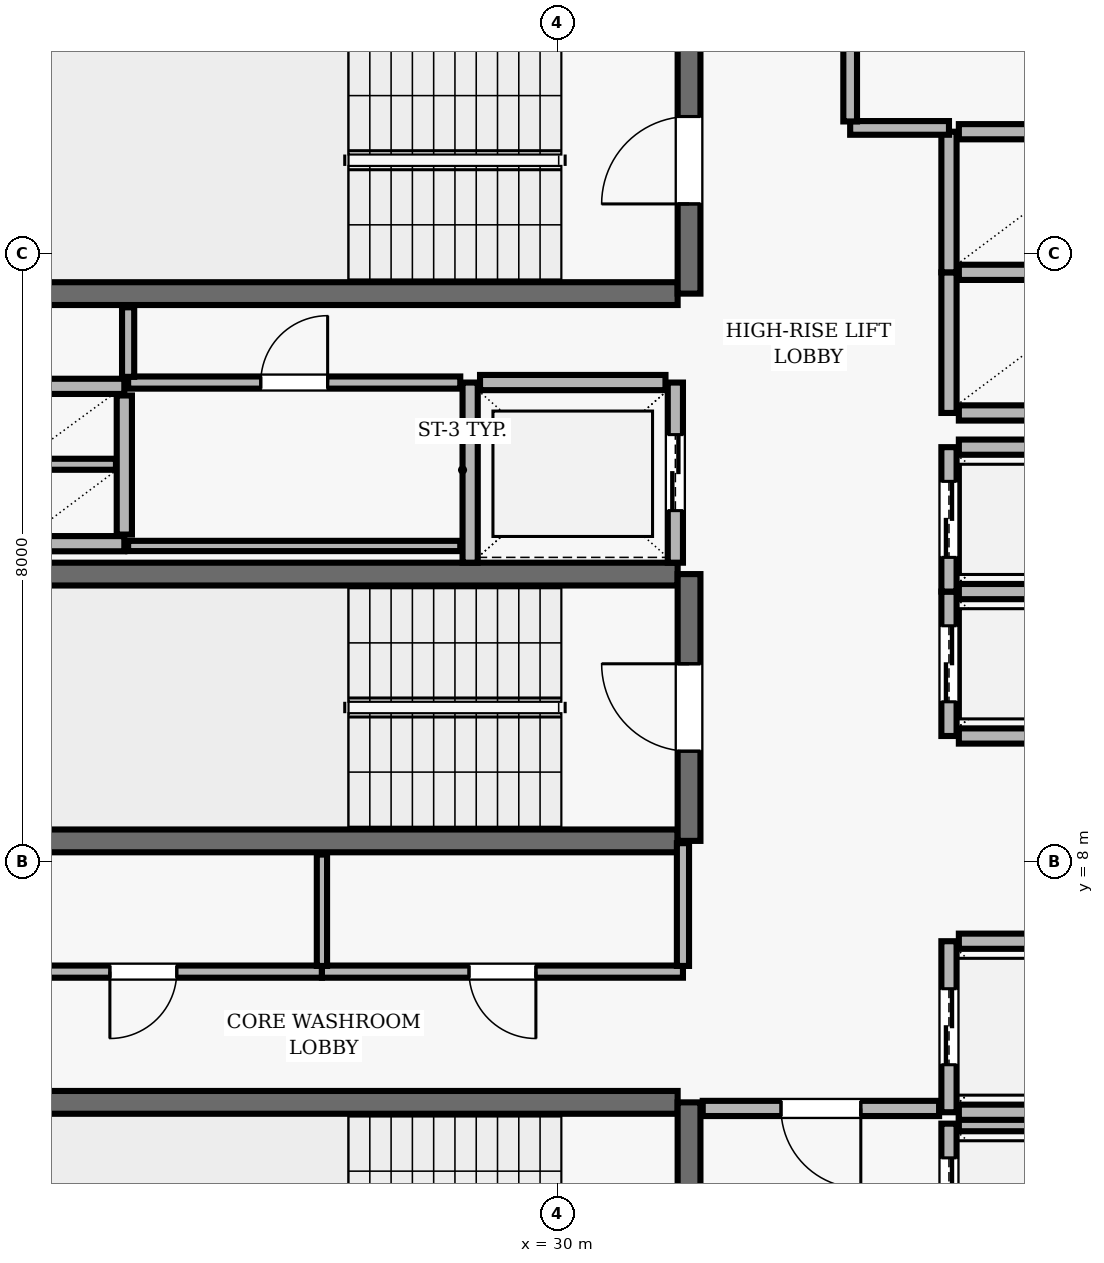
"""IFC4 building model, lengths in metres.
Left out: names, types, materials, properties, quantities, classifications, styles, units other than length and angle.
Written with IfcOpenShell. Run it as: python <this file> out.ifc"""

import sys

from ifc_helpers import new_model, si_unit, direction, frame, frame_2d, origin, place, context, subcontext, project, spatial, rectangle, extrude, element, fill, save


model = new_model("IFC4")
c1 = context("Model", 3, precision=1e-05, world=origin(), true_north=direction((0.0, 1.0)))
c2 = subcontext(c1, "Body", "Model", "MODEL_VIEW")
j1 = project(units=[si_unit("LENGTHUNIT", "METRE"), si_unit("PLANEANGLEUNIT", "RADIAN")], contexts=[c1])
p1 = place(None, origin())
s1 = spatial("IfcSite", under=j1, at=p1, CompositionType="ELEMENT")
p2 = place(p1, origin())
s2 = spatial("IfcBuilding", under=s1, at=p2, CompositionType="ELEMENT")
p3 = place(p2, frame((0.0, 0.0, 226.5)))
s3 = spatial("IfcBuildingStorey", under=s2, at=p3, CompositionType="ELEMENT", Elevation=226.5)
p4 = place(p3, frame((31.58, 4.83, 0.0), z_axis=(0.0, 0.0, 1.0), x_axis=(-1.0, 0.0, 0.0)))
e1 = element("IfcWall", 1, at=p4, inside=s3, PredefinedType="SHEAR", context=c2, shape_type="SweptSolid", body=[
    extrude(rectangle(XDim=8.36, YDim=0.3, at=frame_2d((4.18, 0.0))), origin(), (0.0, 0.0, 1.0), 3.69),
])
p5 = place(p3, frame((31.73, 0.96, 0.0), z_axis=(0.0, 0.0, 1.0), x_axis=(0.0, 1.0, 0.0)))
e2 = element("IfcWall", 2, at=p5, inside=s3, PredefinedType="SHEAR", context=c2, shape_type="SweptSolid", body=[
    extrude(rectangle(XDim=3.87, YDim=0.3, at=frame_2d((1.935, 0.0))), origin(), (0.0, 0.0, 1.0), 3.69),
])
p6 = place(p5, frame((1.54, 0.0, 0.0)))
e3 = element("IfcOpeningElement", 3, at=p6, cuts=e2, PredefinedType="OPENING", context=c2, shape_type="SweptSolid", body=[
    extrude(rectangle(XDim=1.15, YDim=2.15, at=frame_2d((0.575, 1.075))), frame((0.0, 0.16, 0.0), z_axis=(0.0, -1.0, 0.0), x_axis=(1.0, 0.0, 0.0)), (0.0, 0.0, 1.0), 0.32),
])
p7 = place(p3, frame((23.22, 15.47, 0.0), z_axis=(0.0, 0.0, 1.0), x_axis=(1.0, 0.0, 0.0)))
e4 = element("IfcWall", 4, at=p7, inside=s3, PredefinedType="SHEAR", context=c2, shape_type="SweptSolid", body=[
    extrude(rectangle(XDim=8.36, YDim=0.3, at=frame_2d((4.18, 0.0))), origin(), (0.0, 0.0, 1.0), 3.69),
])
p8 = place(p3, frame((31.73, 15.47, 0.0), z_axis=(0.0, 0.0, 1.0), x_axis=(0.0, 1.0, 0.0)))
e5 = element("IfcWall", 5, at=p8, inside=s3, PredefinedType="SHEAR", context=c2, shape_type="SweptSolid", body=[
    extrude(rectangle(XDim=3.51, YDim=0.3, at=frame_2d((1.755, 0.0))), origin(), (0.0, 0.0, 1.0), 3.69),
])
p9 = place(p8, frame((1.18, 0.0, 0.0)))
e6 = element("IfcOpeningElement", 6, at=p9, cuts=e5, PredefinedType="OPENING", context=c2, shape_type="SweptSolid", body=[
    extrude(rectangle(XDim=1.15, YDim=2.15, at=frame_2d((0.575, 1.075))), frame((0.0, 0.16, 0.0), z_axis=(0.0, -1.0, 0.0), x_axis=(1.0, 0.0, 0.0)), (0.0, 0.0, 1.0), 0.32),
])
for number, where, z_axis, x_axis in (
    (7, (31.58, 11.78, 0.0), (0.0, 0.0, 1.0), (-1.0, 0.0, 0.0)),
    (8, (23.22, 8.27, 0.0), (0.0, 0.0, 1.0), (1.0, 0.0, 0.0)),
):
    element("IfcWall", number, at=place(p3, frame(where, z_axis=z_axis, x_axis=x_axis)), inside=s3, PredefinedType="SHEAR", context=c2, shape_type="SweptSolid", body=[
        extrude(rectangle(XDim=8.36, YDim=0.3, at=frame_2d((4.18, 0.0))), origin(), (0.0, 0.0, 1.0), 3.69),
    ])
p10 = place(p3, frame((31.73, 8.27, 0.0), z_axis=(0.0, 0.0, 1.0), x_axis=(0.0, 1.0, 0.0)))
e9 = element("IfcWall", 9, at=p10, inside=s3, PredefinedType="SHEAR", context=c2, shape_type="SweptSolid", body=[
    extrude(rectangle(XDim=3.51, YDim=0.3, at=frame_2d((1.755, 0.0))), origin(), (0.0, 0.0, 1.0), 3.69),
])
p11 = place(p10, frame((1.18, 0.0, 0.0)))
e10 = element("IfcOpeningElement", 10, at=p11, cuts=e9, PredefinedType="OPENING", context=c2, shape_type="SweptSolid", body=[
    extrude(rectangle(XDim=1.15, YDim=2.15, at=frame_2d((0.575, 1.075))), frame((0.0, 0.16, 0.0), z_axis=(0.0, -1.0, 0.0), x_axis=(1.0, 0.0, 0.0)), (0.0, 0.0, 1.0), 0.32),
])
p12 = place(p3, frame((35.15, 4.55, 0.0), z_axis=(0.0, 0.0, 1.0), x_axis=(0.0, -1.0, 0.0)))
e11 = element("IfcWall", 11, at=p12, inside=s3, PredefinedType="SOLIDWALL", context=c2, shape_type="SweptSolid", body=[
    extrude(rectangle(XDim=2.1, YDim=0.2, at=frame_2d((1.05, 0.0))), origin(), (0.0, 0.0, 1.0), 3.69),
])
p13 = place(p12, frame((0.45, 0.0, 0.0)))
e12 = element("IfcOpeningElement", 12, at=p13, cuts=e11, PredefinedType="OPENING", context=c2, shape_type="SweptSolid", body=[
    extrude(rectangle(XDim=1.2, YDim=2.15, at=frame_2d((0.6, 1.075))), frame((0.0, 0.11, 0.0), z_axis=(0.0, -1.0, 0.0), x_axis=(1.0, 0.0, 0.0)), (0.0, 0.0, 1.0), 0.22),
])
p14 = place(p3, frame((37.42, 4.55, 0.0), z_axis=(0.0, 0.0, 1.0), x_axis=(-1.0, 0.0, 0.0)))
e13 = element("IfcWall", 13, at=p14, inside=s3, PredefinedType="SOLIDWALL", context=c2, shape_type="SweptSolid", body=[
    extrude(rectangle(XDim=2.14, YDim=0.2, at=frame_2d((1.07, 0.0))), origin(), (0.0, 0.0, 1.0), 3.69),
])
p15 = place(p3, frame((35.15, 6.95, 0.0), z_axis=(0.0, 0.0, 1.0), x_axis=(0.0, -1.0, 0.0)))
e14 = element("IfcWall", 14, at=p15, inside=s3, PredefinedType="SOLIDWALL", context=c2, shape_type="SweptSolid", body=[
    extrude(rectangle(XDim=2.25, YDim=0.2, at=frame_2d((1.125, 0.0))), origin(), (0.0, 0.0, 1.0), 3.69),
])
p16 = place(p15, frame((0.625, 0.0, 0.0)))
e15 = element("IfcOpeningElement", 15, at=p16, cuts=e14, PredefinedType="OPENING", context=c2, shape_type="SweptSolid", body=[
    extrude(rectangle(XDim=1.0, YDim=2.1, at=frame_2d((0.5, 1.05))), frame((0.0, 0.11, 0.0), z_axis=(0.0, -1.0, 0.0), x_axis=(1.0, 0.0, 0.0)), (0.0, 0.0, 1.0), 0.22),
])
for number, where, z_axis, x_axis in (
    (16, (35.28, 4.7, 0.0), (0.0, 0.0, 1.0), (1.0, 0.0, 0.0)),
    (17, (37.42, 6.95, 0.0), (0.0, 0.0, 1.0), (-1.0, 0.0, 0.0)),
):
    element("IfcWall", number, at=place(p3, frame(where, z_axis=z_axis, x_axis=x_axis)), inside=s3, PredefinedType="SOLIDWALL", context=c2, shape_type="SweptSolid", body=[
        extrude(rectangle(XDim=2.14, YDim=0.2, at=frame_2d((1.07, 0.0))), origin(), (0.0, 0.0, 1.0), 3.69),
    ])
p17 = place(p3, frame((35.15, 11.55, 0.0), z_axis=(0.0, 0.0, 1.0), x_axis=(0.0, -1.0, 0.0)))
e18 = element("IfcWall", 18, at=p17, inside=s3, PredefinedType="SOLIDWALL", context=c2, shape_type="SweptSolid", body=[
    extrude(rectangle(XDim=1.9, YDim=0.2, at=frame_2d((0.95, 0.0))), origin(), (0.0, 0.0, 1.0), 3.69),
])
p18 = place(p17, frame((0.45, 0.0, 0.0)))
e19 = element("IfcOpeningElement", 19, at=p18, cuts=e18, PredefinedType="OPENING", context=c2, shape_type="SweptSolid", body=[
    extrude(rectangle(XDim=1.0, YDim=2.1, at=frame_2d((0.5, 1.05))), frame((0.0, 0.11, 0.0), z_axis=(0.0, -1.0, 0.0), x_axis=(1.0, 0.0, 0.0)), (0.0, 0.0, 1.0), 0.22),
])
for number, where, z_axis, x_axis in (
    (20, (35.28, 9.65, 0.0), (0.0, 0.0, 1.0), (1.0, 0.0, 0.0)),
    (21, (37.42, 11.55, 0.0), (0.0, 0.0, 1.0), (-1.0, 0.0, 0.0)),
):
    element("IfcWall", number, at=place(p3, frame(where, z_axis=z_axis, x_axis=x_axis)), inside=s3, PredefinedType="SOLIDWALL", context=c2, shape_type="SweptSolid", body=[
        extrude(rectangle(XDim=2.14, YDim=0.2, at=frame_2d((1.07, 0.0))), origin(), (0.0, 0.0, 1.0), 3.69),
    ])
p19 = place(p3, frame((35.15, 13.45, 0.0), z_axis=(0.0, 0.0, 1.0), x_axis=(0.0, -1.0, 0.0)))
e22 = element("IfcWall", 22, at=p19, inside=s3, PredefinedType="SOLIDWALL", context=c2, shape_type="SweptSolid", body=[
    extrude(rectangle(XDim=1.9, YDim=0.2, at=frame_2d((0.95, 0.0))), origin(), (0.0, 0.0, 1.0), 3.69),
])
p20 = place(p19, frame((0.45, 0.0, 0.0)))
e23 = element("IfcOpeningElement", 23, at=p20, cuts=e22, PredefinedType="OPENING", context=c2, shape_type="SweptSolid", body=[
    extrude(rectangle(XDim=1.0, YDim=2.1, at=frame_2d((0.5, 1.05))), frame((0.0, 0.11, 0.0), z_axis=(0.0, -1.0, 0.0), x_axis=(1.0, 0.0, 0.0)), (0.0, 0.0, 1.0), 0.22),
])
p21 = place(p3, frame((37.42, 13.45, 0.0), z_axis=(0.0, 0.0, 1.0), x_axis=(-1.0, 0.0, 0.0)))
e24 = element("IfcWall", 24, at=p21, inside=s3, PredefinedType="SOLIDWALL", context=c2, shape_type="SweptSolid", body=[
    extrude(rectangle(XDim=2.14, YDim=0.2, at=frame_2d((1.07, 0.0))), origin(), (0.0, 0.0, 1.0), 3.69),
])
p22 = place(p3, frame((28.85, 14.3, 0.0), z_axis=(0.0, 0.0, 1.0), x_axis=(0.0, -1.0, 0.0)))
e25 = element("IfcWall", 25, at=p22, inside=s3, PredefinedType="SOLIDWALL", context=c2, shape_type="SweptSolid", body=[
    extrude(rectangle(XDim=2.37, YDim=0.2, at=frame_2d((1.185, 0.0))), origin(), (0.0, 0.0, 1.0), 3.69),
])
p23 = place(p3, frame((31.55, 11.93, 0.0), z_axis=(0.0, 0.0, 1.0), x_axis=(0.0, 1.0, 0.0)))
e26 = element("IfcWall", 26, at=p23, inside=s3, PredefinedType="SOLIDWALL", context=c2, shape_type="SweptSolid", body=[
    extrude(rectangle(XDim=2.37, YDim=0.2, at=frame_2d((1.185, 0.0))), origin(), (0.0, 0.0, 1.0), 3.69),
])
p24 = place(p23, frame((0.685, 0.0, 0.0)))
e27 = element("IfcOpeningElement", 27, at=p24, cuts=e26, PredefinedType="OPENING", context=c2, shape_type="SweptSolid", body=[
    extrude(rectangle(XDim=1.0, YDim=2.1, at=frame_2d((0.5, 1.05))), frame((0.0, 0.11, 0.0), z_axis=(0.0, -1.0, 0.0), x_axis=(1.0, 0.0, 0.0)), (0.0, 0.0, 1.0), 0.22),
])
p25 = place(p3, frame((31.42, 14.3, 0.0), z_axis=(0.0, 0.0, 1.0), x_axis=(-1.0, 0.0, 0.0)))
e28 = element("IfcWall", 28, at=p25, inside=s3, PredefinedType="SOLIDWALL", context=c2, shape_type="SweptSolid", body=[
    extrude(rectangle(XDim=2.44, YDim=0.2, at=frame_2d((1.22, 0.0))), origin(), (0.0, 0.0, 1.0), 3.69),
])
p26 = place(p3, frame((35.15, 15.75, 0.0), z_axis=(0.0, 0.0, 1.0), x_axis=(0.0, -1.0, 0.0)))
e29 = element("IfcWall", 29, at=p26, inside=s3, PredefinedType="SOLIDWALL", context=c2, shape_type="SweptSolid", body=[
    extrude(rectangle(XDim=1.85, YDim=0.2, at=frame_2d((0.925, 0.0))), origin(), (0.0, 0.0, 1.0), 3.69),
])
for number, where, z_axis, x_axis in (
    (30, (35.28, 13.9, 0.0), (0.0, 0.0, 1.0), (1.0, 0.0, 0.0)),
    (31, (37.42, 15.75, 0.0), (0.0, 0.0, 1.0), (-1.0, 0.0, 0.0)),
):
    element("IfcWall", number, at=place(p3, frame(where, z_axis=z_axis, x_axis=x_axis)), inside=s3, PredefinedType="SOLIDWALL", context=c2, shape_type="SweptSolid", body=[
        extrude(rectangle(XDim=2.14, YDim=0.2, at=frame_2d((1.07, 0.0))), origin(), (0.0, 0.0, 1.0), 3.69),
    ])
p27 = place(p3, frame((35.15, 17.6, 0.0), z_axis=(0.0, 0.0, 1.0), x_axis=(0.0, -1.0, 0.0)))
e32 = element("IfcWall", 32, at=p27, inside=s3, PredefinedType="SOLIDWALL", context=c2, shape_type="SweptSolid", body=[
    extrude(rectangle(XDim=1.85, YDim=0.2, at=frame_2d((0.925, 0.0))), origin(), (0.0, 0.0, 1.0), 3.69),
])
p28 = place(p3, frame((37.42, 17.6, 0.0), z_axis=(0.0, 0.0, 1.0), x_axis=(-1.0, 0.0, 0.0)))
e33 = element("IfcWall", 33, at=p28, inside=s3, PredefinedType="SOLIDWALL", context=c2, shape_type="SweptSolid", body=[
    extrude(rectangle(XDim=2.14, YDim=0.2, at=frame_2d((1.07, 0.0))), origin(), (0.0, 0.0, 1.0), 3.69),
])
for number, where, z_axis, x_axis in (
    (34, (22.9, 14.25, 0.0), (0.0, 0.0, 1.0), (1.0, 0.0, 0.0)),
    (35, (22.9, 12.18, 0.0), (0.0, 0.0, 1.0), (1.0, 0.0, 0.0)),
):
    element("IfcWall", number, at=place(p3, frame(where, z_axis=z_axis, x_axis=x_axis)), inside=s3, PredefinedType="SOLIDWALL", context=c2, shape_type="SweptSolid", body=[
        extrude(rectangle(XDim=1.4, YDim=0.2, at=frame_2d((0.7, 0.0))), origin(), (0.0, 0.0, 1.0), 3.69),
    ])
p29 = place(p3, frame((24.3, 12.3, 0.0), z_axis=(0.0, 0.0, 1.0), x_axis=(0.0, 1.0, 0.0)))
e36 = element("IfcWall", 36, at=p29, inside=s3, PredefinedType="SOLIDWALL", context=c2, shape_type="SweptSolid", body=[
    extrude(rectangle(XDim=1.83, YDim=0.2, at=frame_2d((0.915, 0.0))), origin(), (0.0, 0.0, 1.0), 3.69),
])
p30 = place(p3, frame((23.01, 13.225, 0.0), z_axis=(0.0, 0.0, 1.0), x_axis=(1.0, 0.0, 0.0)))
e37 = element("IfcWall", 37, at=p30, inside=s3, PredefinedType="PARTITIONING", context=c2, shape_type="SweptSolid", body=[
    extrude(rectangle(XDim=1.18, YDim=0.145, at=frame_2d((0.59, 0.0))), origin(), (0.0, 0.0, 1.0), 3.69),
])
p31 = place(p3, frame((24.35, 12.15, 0.0), z_axis=(0.0, 0.0, 1.0), x_axis=(1.0, 0.0, 0.0)))
e38 = element("IfcWall", 38, at=p31, inside=s3, PredefinedType="PARTITIONING", context=c2, shape_type="SweptSolid", body=[
    extrude(rectangle(XDim=4.37, YDim=0.135, at=frame_2d((2.185, 0.0))), origin(), (0.0, 0.0, 1.0), 3.69),
])
p32 = place(p3, frame((24.35, 14.3, 0.0), z_axis=(0.0, 0.0, 1.0), x_axis=(1.0, 0.0, 0.0)))
e39 = element("IfcWall", 39, at=p32, inside=s3, PredefinedType="PARTITIONING", context=c2, shape_type="SweptSolid", body=[
    extrude(rectangle(XDim=4.37, YDim=0.16, at=frame_2d((2.185, 0.0))), origin(), (0.0, 0.0, 1.0), 3.69),
])
p33 = place(p32, frame((1.745, 0.0, 0.0)))
e40 = element("IfcOpeningElement", 40, at=p33, cuts=e39, PredefinedType="OPENING", context=c2, shape_type="SweptSolid", body=[
    extrude(rectangle(XDim=0.88, YDim=2.1, at=frame_2d((0.44, 1.05))), frame((0.0, 0.09, 0.0), z_axis=(0.0, -1.0, 0.0), x_axis=(1.0, 0.0, 0.0)), (0.0, 0.0, 1.0), 0.18),
])
p34 = place(p3, frame((26.9, 6.55, 0.0), z_axis=(0.0, 0.0, 1.0), x_axis=(-1.0, 0.0, 0.0)))
e41 = element("IfcWall", 41, at=p34, inside=s3, PredefinedType="PARTITIONING", context=c2, shape_type="SweptSolid", body=[
    extrude(rectangle(XDim=4.7, YDim=0.16, at=frame_2d((2.35, 0.0))), origin(), (0.0, 0.0, 1.0), 3.69),
])
p35 = place(p34, frame((1.91, 0.0, 0.0)))
e42 = element("IfcOpeningElement", 42, at=p35, cuts=e41, PredefinedType="OPENING", context=c2, shape_type="SweptSolid", body=[
    extrude(rectangle(XDim=0.88, YDim=2.1, at=frame_2d((0.44, 1.05))), frame((0.0, 0.09, 0.0), z_axis=(0.0, -1.0, 0.0), x_axis=(1.0, 0.0, 0.0)), (0.0, 0.0, 1.0), 0.18),
])
p36 = place(p3, frame((31.65, 6.55, 0.0), z_axis=(0.0, 0.0, 1.0), x_axis=(-1.0, 0.0, 0.0)))
e43 = element("IfcWall", 43, at=p36, inside=s3, PredefinedType="PARTITIONING", context=c2, shape_type="SweptSolid", body=[
    extrude(rectangle(XDim=4.75, YDim=0.16, at=frame_2d((2.375, 0.0))), origin(), (0.0, 0.0, 1.0), 3.69),
])
p37 = place(p36, frame((1.935, 0.0, 0.0)))
e44 = element("IfcOpeningElement", 44, at=p37, cuts=e43, PredefinedType="OPENING", context=c2, shape_type="SweptSolid", body=[
    extrude(rectangle(XDim=0.88, YDim=2.1, at=frame_2d((0.44, 1.05))), frame((0.0, 0.09, 0.0), z_axis=(0.0, -1.0, 0.0), x_axis=(1.0, 0.0, 0.0)), (0.0, 0.0, 1.0), 0.18),
])
p38 = place(p3, frame((33.85, 17.65, 0.0), z_axis=(0.0, 0.0, 1.0), x_axis=(1.0, 0.0, 0.0)))
e45 = element("IfcWall", 45, at=p38, inside=s3, PredefinedType="PARTITIONING", context=c2, shape_type="SweptSolid", body=[
    extrude(rectangle(XDim=1.3, YDim=0.18, at=frame_2d((0.65, 0.0))), origin(), (0.0, 0.0, 1.0), 3.69),
])
p39 = place(p3, frame((35.02, 4.75, 0.0), z_axis=(0.0, 0.0, 1.0), x_axis=(-1.0, 0.0, 0.0)))
e46 = element("IfcWall", 46, at=p39, inside=s3, PredefinedType="SOLIDWALL", context=c2, shape_type="SweptSolid", body=[
    extrude(rectangle(XDim=3.11, YDim=0.2, at=frame_2d((1.555, 0.0))), origin(), (0.0, 0.0, 1.0), 3.69),
])
p40 = place(p39, frame((1.03, 0.0, 0.0)))
e47 = element("IfcOpeningElement", 47, at=p40, cuts=e46, PredefinedType="OPENING", context=c2, shape_type="SweptSolid", body=[
    extrude(rectangle(XDim=1.05, YDim=2.15, at=frame_2d((0.525, 1.075))), frame((0.0, 0.11, 0.0), z_axis=(0.0, -1.0, 0.0), x_axis=(1.0, 0.0, 0.0)), (0.0, 0.0, 1.0), 0.22),
])
p41 = place(p3, frame((24.35, 15.29, 0.0), z_axis=(0.0, 0.0, 1.0), x_axis=(0.0, -1.0, 0.0)))
e48 = element("IfcWall", 48, at=p41, inside=s3, PredefinedType="PARTITIONING", context=c2, shape_type="SweptSolid", body=[
    extrude(rectangle(XDim=0.915, YDim=0.16, at=frame_2d((0.458, 0.0))), origin(), (0.0, 0.0, 1.0), 3.69),
])
p42 = place(p3, frame((26.9, 6.625, 0.0), z_axis=(0.0, 0.0, 1.0), x_axis=(0.0, 1.0, 0.0)))
e49 = element("IfcWall", 49, at=p42, inside=s3, PredefinedType="PARTITIONING", context=c2, shape_type="SweptSolid", body=[
    extrude(rectangle(XDim=1.465, YDim=0.135, at=frame_2d((0.732, 0.0))), origin(), (0.0, 0.0, 1.0), 3.69),
])
p43 = place(p3, frame((31.65, 8.24, 0.0), z_axis=(0.0, 0.0, 1.0), x_axis=(0.0, -1.0, 0.0)))
e50 = element("IfcWall", 50, at=p43, inside=s3, PredefinedType="PARTITIONING", context=c2, shape_type="SweptSolid", body=[
    extrude(rectangle(XDim=1.615, YDim=0.16, at=frame_2d((0.808, 0.0))), origin(), (0.0, 0.0, 1.0), 3.69),
])
p44 = place(p3, frame((33.85, 17.735, 0.0), z_axis=(0.0, 0.0, 1.0), x_axis=(0.0, 1.0, 0.0)))
e51 = element("IfcWall", 51, at=p44, inside=s3, PredefinedType="PARTITIONING", context=c2, shape_type="SweptSolid", body=[
    extrude(rectangle(XDim=2.93, YDim=0.18, at=frame_2d((1.465, 0.0))), origin(), (0.0, 0.0, 1.0), 3.69),
])
p45 = place(p44, frame((0.99, 0.0, 0.0)))
e52 = element("IfcOpeningElement", 52, at=p45, cuts=e51, PredefinedType="OPENING", context=c2, shape_type="SweptSolid", body=[
    extrude(rectangle(XDim=0.95, YDim=2.1, at=frame_2d((0.475, 1.05))), frame((0.0, 0.1, 0.0), z_axis=(0.0, -1.0, 0.0), x_axis=(1.0, 0.0, 0.0)), (0.0, 0.0, 1.0), 0.2),
])
p46 = place(p9, origin())
e53 = element("IfcDoor", 53, at=p46, inside=s3, OperationType="SINGLE_SWING_LEFT", PredefinedType="DOOR", context=c2, shape_type="SweptSolid", body=[
    extrude(rectangle(XDim=1.15, YDim=2.15, at=frame_2d((0.575, 1.075))), frame((0.0, 0.025, 0.0), z_axis=(0.0, -1.0, 0.0), x_axis=(1.0, 0.0, 0.0)), (0.0, 0.0, 1.0), 0.05),
])
fill(e6, e53)
p47 = place(p11, origin())
e54 = element("IfcDoor", 54, at=p47, inside=s3, OperationType="SINGLE_SWING_RIGHT", PredefinedType="DOOR", context=c2, shape_type="SweptSolid", body=[
    extrude(rectangle(XDim=1.15, YDim=2.15, at=frame_2d((0.575, 1.075))), frame((0.0, 0.025, 0.0), z_axis=(0.0, -1.0, 0.0), x_axis=(1.0, 0.0, 0.0)), (0.0, 0.0, 1.0), 0.05),
])
fill(e10, e54)
p48 = place(p13, origin())
e55 = element("IfcDoor", 55, at=p48, inside=s3, OperationType="DOUBLE_DOOR_SLIDING", PredefinedType="DOOR", context=c2, shape_type="SweptSolid", body=[
    extrude(rectangle(XDim=1.2, YDim=2.15, at=frame_2d((0.6, 1.075))), frame((0.0, 0.025, 0.0), z_axis=(0.0, -1.0, 0.0), x_axis=(1.0, 0.0, 0.0)), (0.0, 0.0, 1.0), 0.05),
])
fill(e12, e55)
p49 = place(p16, origin())
e56 = element("IfcDoor", 56, at=p49, inside=s3, OperationType="DOUBLE_DOOR_SLIDING", PredefinedType="DOOR", context=c2, shape_type="SweptSolid", body=[
    extrude(rectangle(XDim=1.0, YDim=2.1, at=frame_2d((0.5, 1.05))), frame((0.0, 0.025, 0.0), z_axis=(0.0, -1.0, 0.0), x_axis=(1.0, 0.0, 0.0)), (0.0, 0.0, 1.0), 0.05),
])
fill(e15, e56)
p50 = place(p18, origin())
e57 = element("IfcDoor", 57, at=p50, inside=s3, OperationType="DOUBLE_DOOR_SLIDING", PredefinedType="DOOR", context=c2, shape_type="SweptSolid", body=[
    extrude(rectangle(XDim=1.0, YDim=2.1, at=frame_2d((0.5, 1.05))), frame((0.0, 0.025, 0.0), z_axis=(0.0, -1.0, 0.0), x_axis=(1.0, 0.0, 0.0)), (0.0, 0.0, 1.0), 0.05),
])
fill(e19, e57)
p51 = place(p20, origin())
e58 = element("IfcDoor", 58, at=p51, inside=s3, OperationType="DOUBLE_DOOR_SLIDING", PredefinedType="DOOR", context=c2, shape_type="SweptSolid", body=[
    extrude(rectangle(XDim=1.0, YDim=2.1, at=frame_2d((0.5, 1.05))), frame((0.0, 0.025, 0.0), z_axis=(0.0, -1.0, 0.0), x_axis=(1.0, 0.0, 0.0)), (0.0, 0.0, 1.0), 0.05),
])
fill(e23, e58)
p52 = place(p24, origin())
e59 = element("IfcDoor", 59, at=p52, inside=s3, OperationType="DOUBLE_DOOR_SLIDING", PredefinedType="DOOR", context=c2, shape_type="SweptSolid", body=[
    extrude(rectangle(XDim=1.0, YDim=2.1, at=frame_2d((0.5, 1.05))), frame((0.0, 0.025, 0.0), z_axis=(0.0, -1.0, 0.0), x_axis=(1.0, 0.0, 0.0)), (0.0, 0.0, 1.0), 0.05),
])
fill(e27, e59)
p53 = place(p40, origin())
e60 = element("IfcDoor", 60, at=p53, inside=s3, OperationType="SINGLE_SWING_LEFT", PredefinedType="DOOR", context=c2, shape_type="SweptSolid", body=[
    extrude(rectangle(XDim=1.05, YDim=2.15, at=frame_2d((0.525, 1.075))), frame((0.0, 0.025, 0.0), z_axis=(0.0, -1.0, 0.0), x_axis=(1.0, 0.0, 0.0)), (0.0, 0.0, 1.0), 0.05),
])
fill(e47, e60)
p54 = place(p35, origin())
e61 = element("IfcDoor", 61, at=p54, inside=s3, OperationType="SINGLE_SWING_RIGHT", PredefinedType="DOOR", context=c2, shape_type="SweptSolid", body=[
    extrude(rectangle(XDim=0.88, YDim=2.1, at=frame_2d((0.44, 1.05))), frame((0.0, 0.025, 0.0), z_axis=(0.0, -1.0, 0.0), x_axis=(1.0, 0.0, 0.0)), (0.0, 0.0, 1.0), 0.05),
])
fill(e42, e61)
p55 = place(p37, origin())
e62 = element("IfcDoor", 62, at=p55, inside=s3, OperationType="SINGLE_SWING_LEFT", PredefinedType="DOOR", context=c2, shape_type="SweptSolid", body=[
    extrude(rectangle(XDim=0.88, YDim=2.1, at=frame_2d((0.44, 1.05))), frame((0.0, 0.025, 0.0), z_axis=(0.0, -1.0, 0.0), x_axis=(1.0, 0.0, 0.0)), (0.0, 0.0, 1.0), 0.05),
])
fill(e44, e62)
p56 = place(p33, origin())
e63 = element("IfcDoor", 63, at=p56, inside=s3, OperationType="SINGLE_SWING_RIGHT", PredefinedType="DOOR", context=c2, shape_type="SweptSolid", body=[
    extrude(rectangle(XDim=0.88, YDim=2.1, at=frame_2d((0.44, 1.05))), frame((0.0, 0.025, 0.0), z_axis=(0.0, -1.0, 0.0), x_axis=(1.0, 0.0, 0.0)), (0.0, 0.0, 1.0), 0.05),
])
fill(e40, e63)
save(model, sys.argv[1])
